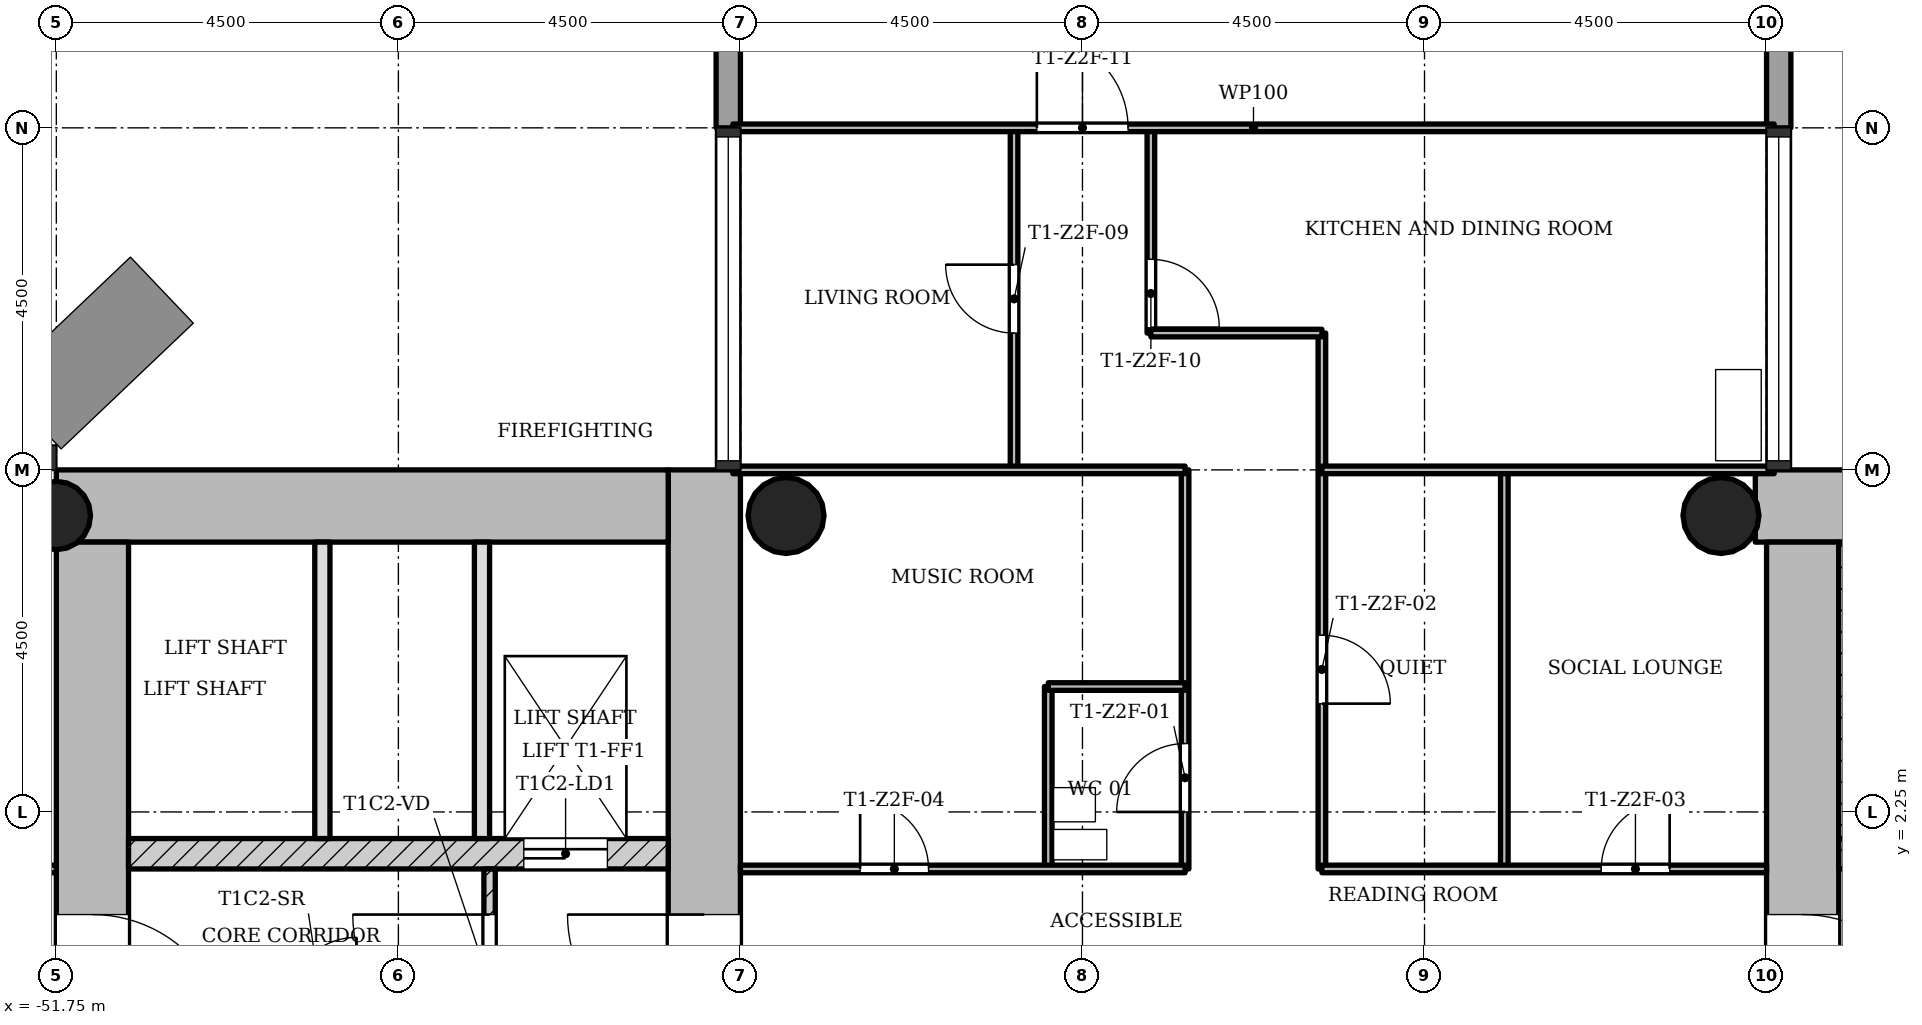
"""IFC4 building model, lengths in metres.
Left out: names, types, materials, properties, quantities, classifications, styles, units other than length and angle.
Written with IfcOpenShell. Run it as: python <this file> out.ifc"""

import sys

from ifc_helpers import new_model, si_unit, direction, frame, frame_2d, origin, origin_2d, place, context, subcontext, project, spatial, rectangle, hollow_circle, extrude, element, fill, save


model = new_model("IFC4")
c1 = context("Model", 3, precision=1e-05, world=origin(), true_north=direction((0.0, 1.0)))
c2 = subcontext(c1, "Body", "Model", "MODEL_VIEW")
j1 = project(units=[si_unit("LENGTHUNIT", "METRE"), si_unit("PLANEANGLEUNIT", "RADIAN")], contexts=[c1])
p1 = place(None, origin())
s1 = spatial("IfcSite", under=j1, at=p1, CompositionType="ELEMENT")
p2 = place(p1, origin())
s2 = spatial("IfcBuilding", under=s1, at=p2, CompositionType="ELEMENT")
p3 = place(p2, frame((0.0, 0.0, 114.0)))
s3 = spatial("IfcBuildingStorey", under=s2, at=p3, CompositionType="ELEMENT", Elevation=114.0)
p4 = place(p3, frame((-20.702, 6.275, 0.0), z_axis=(0.0, 0.0, 1.0), x_axis=(-1.0, 0.0, 0.0)))
e1 = element("IfcWall", 1, at=p4, inside=s3, PredefinedType="SHEAR", context=c2, shape_type="SweptSolid", body=[
    extrude(rectangle(XDim=8.696, YDim=0.95, at=frame_2d((4.348, 0.0))), origin(), (0.0, 0.0, 1.0), 3.4),
])
p5 = place(p3, frame((-28.775, 5.8, 0.0), z_axis=(0.0, 0.0, 1.0), x_axis=(0.0, -1.0, 0.0)))
e2 = element("IfcWall", 2, at=p5, inside=s3, PredefinedType="SHEAR", context=c2, shape_type="SweptSolid", body=[
    extrude(rectangle(XDim=12.55, YDim=0.95, at=frame_2d((6.275, 0.0))), origin(), (0.0, 0.0, 1.0), 3.4),
])
p6 = place(p5, frame((4.9, 0.0, 0.0)))
e3 = element("IfcOpeningElement", 3, at=p6, cuts=e2, PredefinedType="OPENING", context=c2, shape_type="SweptSolid", body=[
    extrude(rectangle(XDim=1.8, YDim=2.1, at=frame_2d((0.9, 1.05))), frame((0.0, 0.485, 0.0), z_axis=(0.0, -1.0, 0.0), x_axis=(1.0, 0.0, 0.0)), (0.0, 0.0, 1.0), 0.97),
])
p7 = place(p3, frame((-28.3, 1.7, 0.0), z_axis=(0.0, 0.0, 1.0), x_axis=(1.0, 0.0, 0.0)))
e4 = element("IfcWall", 4, at=p7, inside=s3, PredefinedType="SHEAR", context=c2, shape_type="SweptSolid", body=[
    extrude(rectangle(XDim=7.1, YDim=0.4, at=frame_2d((3.55, 0.0))), origin(), (0.0, 0.0, 1.0), 3.4),
])
p8 = place(p7, frame((0.7, 0.0, 0.0)))
e5 = element("IfcOpeningElement", 5, at=p8, cuts=e4, PredefinedType="OPENING", context=c2, shape_type="SweptSolid", body=[
    extrude(rectangle(XDim=0.9, YDim=2.1, at=frame_2d((0.45, 1.05))), frame((0.0, 0.21, 0.0), z_axis=(0.0, -1.0, 0.0), x_axis=(1.0, 0.0, 0.0)), (0.0, 0.0, 1.0), 0.42),
])
p9 = place(p3, frame((-43.225, -5.8, 0.0), z_axis=(0.0, 0.0, 1.0), x_axis=(0.0, 1.0, 0.0)))
e6 = element("IfcWall", 6, at=p9, inside=s3, PredefinedType="SHEAR", context=c2, shape_type="SweptSolid", body=[
    extrude(rectangle(XDim=12.55, YDim=0.95, at=frame_2d((6.275, 0.0))), origin(), (0.0, 0.0, 1.0), 3.4),
])
p10 = place(p9, frame((4.9, 0.0, 0.0)))
e7 = element("IfcOpeningElement", 7, at=p10, cuts=e6, PredefinedType="OPENING", context=c2, shape_type="SweptSolid", body=[
    extrude(rectangle(XDim=1.8, YDim=2.1, at=frame_2d((0.9, 1.05))), frame((0.0, 0.485, 0.0), z_axis=(0.0, -1.0, 0.0), x_axis=(1.0, 0.0, 0.0)), (0.0, 0.0, 1.0), 0.97),
])
p11 = place(p3, frame((-43.7, 6.275, 0.0), z_axis=(0.0, 0.0, 1.0), x_axis=(-1.0, 0.0, 0.0)))
e8 = element("IfcWall", 8, at=p11, inside=s3, PredefinedType="SHEAR", context=c2, shape_type="SweptSolid", body=[
    extrude(rectangle(XDim=8.05, YDim=0.95, at=frame_2d((4.025, 0.0))), origin(), (0.0, 0.0, 1.0), 3.4),
])
p12 = place(p3, frame((-51.275, 5.8, 0.0), z_axis=(0.0, 0.0, 1.0), x_axis=(0.0, -1.0, 0.0)))
e9 = element("IfcWall", 9, at=p12, inside=s3, PredefinedType="SHEAR", context=c2, shape_type="SweptSolid", body=[
    extrude(rectangle(XDim=12.55, YDim=0.95, at=frame_2d((6.275, 0.0))), origin(), (0.0, 0.0, 1.0), 3.4),
])
p13 = place(p12, frame((4.9, 0.0, 0.0)))
e10 = element("IfcOpeningElement", 10, at=p13, cuts=e9, PredefinedType="OPENING", context=c2, shape_type="SweptSolid", body=[
    extrude(rectangle(XDim=1.8, YDim=2.1, at=frame_2d((0.9, 1.05))), frame((0.0, 0.485, 0.0), z_axis=(0.0, -1.0, 0.0), x_axis=(1.0, 0.0, 0.0)), (0.0, 0.0, 1.0), 0.97),
])
p14 = place(p3, frame((-50.8, 1.7, 0.0), z_axis=(0.0, 0.0, 1.0), x_axis=(1.0, 0.0, 0.0)))
e11 = element("IfcWall", 11, at=p14, inside=s3, PredefinedType="SHEAR", context=c2, shape_type="SweptSolid", body=[
    extrude(rectangle(XDim=7.1, YDim=0.4, at=frame_2d((3.55, 0.0))), origin(), (0.0, 0.0, 1.0), 3.4),
])
p15 = place(p14, frame((5.2, 0.0, 0.0)))
e12 = element("IfcOpeningElement", 12, at=p15, cuts=e11, PredefinedType="OPENING", context=c2, shape_type="SweptSolid", body=[
    extrude(rectangle(XDim=1.1, YDim=2.1, at=frame_2d((0.55, 1.05))), frame((0.0, 0.21, 0.0), z_axis=(0.0, -1.0, 0.0), x_axis=(1.0, 0.0, 0.0)), (0.0, 0.0, 1.0), 0.42),
])
p16 = place(p3, frame((-51.75, 6.15, 0.0), z_axis=(0.0, 0.0, 1.0), x_axis=(1.0, 0.0, 0.0)))
e13 = element("IfcColumn", 13, at=p16, inside=s3, PredefinedType="COLUMN", context=c2, shape_type="SweptSolid", body=[
    extrude(hollow_circle(Radius=0.45, WallThickness=0.032, at=origin_2d()), origin(), (0.0, 0.0, 1.0), 3.4),
])
for number, where, z_axis, x_axis in (
    (14, (-29.85, 6.15, 0.0), (0.0, 0.0, 1.0), (1.0, 0.0, 0.0)),
    (15, (-42.15, 6.15, 0.0), (0.0, 0.0, 1.0), (1.0, 0.0, 0.0)),
):
    element("IfcColumn", number, at=place(p3, frame(where, z_axis=z_axis, x_axis=x_axis)), inside=s3, PredefinedType="COLUMN", context=c2, shape_type="SweptSolid", body=[
        extrude(hollow_circle(Radius=0.5, WallThickness=0.036, at=origin_2d()), origin(), (0.0, 0.0, 1.0), 3.4),
    ])
p17 = place(p3, frame((-29.09, 11.25, -0.3), z_axis=(0.0, 0.0, 1.0), x_axis=(0.0, 1.0, 0.0)))
e16 = element("IfcWall", 16, at=p17, inside=s3, PredefinedType="STANDARD", context=c2, shape_type="SweptSolid", body=[
    extrude(rectangle(XDim=1.82, YDim=0.32, at=frame_2d((0.91, 0.0))), origin(), (0.0, 0.0, 1.0), 3.4),
])
p18 = place(p3, frame((-42.91, 12.75, -0.3), z_axis=(0.0, 0.0, 1.0), x_axis=(0.0, -1.0, 0.0)))
e17 = element("IfcWall", 17, at=p18, inside=s3, PredefinedType="STANDARD", context=c2, shape_type="SweptSolid", body=[
    extrude(rectangle(XDim=1.5, YDim=0.32, at=frame_2d((0.75, 0.0))), origin(), (0.0, 0.0, 1.0), 3.4),
])
p19 = place(p3, frame((-46.05, 1.5, 0.0), z_axis=(0.0, 0.0, 1.0), x_axis=(0.0, -1.0, 0.0)))
e18 = element("IfcWall", 18, at=p19, inside=s3, PredefinedType="PARTITIONING", context=c2, shape_type="SweptSolid", body=[
    extrude(rectangle(XDim=3.0, YDim=0.15, at=frame_2d((1.5, 0.0))), origin(), (0.0, 0.0, 1.0), 3.0),
])
p20 = place(p19, frame((0.6, 0.0, 0.0)))
e19 = element("IfcOpeningElement", 19, at=p20, cuts=e18, PredefinedType="OPENING", context=c2, shape_type="SweptSolid", body=[
    extrude(rectangle(XDim=1.8, YDim=2.1, at=frame_2d((0.9, 1.05))), frame((0.0, 0.085, 0.0), z_axis=(0.0, -1.0, 0.0), x_axis=(1.0, 0.0, 0.0)), (0.0, 0.0, 1.0), 0.17),
])
for number, where, z_axis, x_axis in (
    (20, (-46.15, 5.8, 0.0), (0.0, 0.0, 1.0), (0.0, -1.0, 0.0)),
    (21, (-48.25, 5.8, 0.0), (0.0, 0.0, 1.0), (0.0, -1.0, 0.0)),
):
    element("IfcWall", number, at=place(p3, frame(where, z_axis=z_axis, x_axis=x_axis)), inside=s3, PredefinedType="SOLIDWALL", context=c2, shape_type="SweptSolid", body=[
        extrude(rectangle(XDim=3.9, YDim=0.2, at=frame_2d((1.95, 0.0))), origin(), (0.0, 0.0, 1.0), 3.0),
    ])
p21 = place(p3, frame((-39.15, 6.75, 0.0), z_axis=(0.0, 0.0, 1.0), x_axis=(0.0, 1.0, 0.0)))
e22 = element("IfcWall", 22, at=p21, inside=s3, PredefinedType="PARTITIONING", context=c2, shape_type="SweptSolid", body=[
    extrude(rectangle(XDim=4.5, YDim=0.1, at=frame_2d((2.25, 0.0))), origin(), (0.0, 0.0, 1.0), 3.0),
])
p22 = place(p21, frame((1.8, 0.0, 0.0)))
e23 = element("IfcOpeningElement", 23, at=p22, cuts=e22, PredefinedType="OPENING", context=c2, shape_type="SweptSolid", body=[
    extrude(rectangle(XDim=0.9, YDim=2.1, at=frame_2d((0.45, 1.05))), frame((0.0, 0.06, 0.0), z_axis=(0.0, -1.0, 0.0), x_axis=(1.0, 0.0, 0.0)), (0.0, 0.0, 1.0), 0.12),
])
p23 = place(p3, frame((-38.7, 1.5, 0.0), z_axis=(0.0, 0.0, 1.0), x_axis=(0.0, 1.0, 0.0)))
e24 = element("IfcWall", 24, at=p23, inside=s3, PredefinedType="PARTITIONING", context=c2, shape_type="SweptSolid", body=[
    extrude(rectangle(XDim=2.4, YDim=0.1, at=frame_2d((1.2, 0.0))), origin(), (0.0, 0.0, 1.0), 3.0),
])
p24 = place(p3, frame((-37.35, 8.55, 0.0), z_axis=(0.0, 0.0, 1.0), x_axis=(0.0, 1.0, 0.0)))
e25 = element("IfcWall", 25, at=p24, inside=s3, PredefinedType="PARTITIONING", context=c2, shape_type="SweptSolid", body=[
    extrude(rectangle(XDim=2.7, YDim=0.1, at=frame_2d((1.35, 0.0))), origin(), (0.0, 0.0, 1.0), 3.0),
])
p25 = place(p24, frame((0.07, 0.0, 0.0)))
e26 = element("IfcOpeningElement", 26, at=p25, cuts=e25, PredefinedType="OPENING", context=c2, shape_type="SweptSolid", body=[
    extrude(rectangle(XDim=0.9, YDim=2.1, at=frame_2d((0.45, 1.05))), frame((0.0, 0.06, 0.0), z_axis=(0.0, -1.0, 0.0), x_axis=(1.0, 0.0, 0.0)), (0.0, 0.0, 1.0), 0.12),
])
p26 = place(p3, frame((-36.9, 1.5, 0.0), z_axis=(0.0, 0.0, 1.0), x_axis=(0.0, 1.0, 0.0)))
e27 = element("IfcWall", 27, at=p26, inside=s3, PredefinedType="PARTITIONING", context=c2, shape_type="SweptSolid", body=[
    extrude(rectangle(XDim=5.25, YDim=0.1, at=frame_2d((2.625, 0.0))), origin(), (0.0, 0.0, 1.0), 3.0),
])
p27 = place(p26, frame((0.75, 0.0, 0.0)))
e28 = element("IfcOpeningElement", 28, at=p27, cuts=e27, PredefinedType="OPENING", context=c2, shape_type="SweptSolid", body=[
    extrude(rectangle(XDim=0.9, YDim=2.1, at=frame_2d((0.45, 1.05))), frame((0.0, 0.06, 0.0), z_axis=(0.0, -1.0, 0.0), x_axis=(1.0, 0.0, 0.0)), (0.0, 0.0, 1.0), 0.12),
])
p28 = place(p3, frame((-35.1, 1.5, 0.0), z_axis=(0.0, 0.0, 1.0), x_axis=(0.0, 1.0, 0.0)))
e29 = element("IfcWall", 29, at=p28, inside=s3, PredefinedType="PARTITIONING", context=c2, shape_type="SweptSolid", body=[
    extrude(rectangle(XDim=7.05, YDim=0.1, at=frame_2d((3.525, 0.0))), origin(), (0.0, 0.0, 1.0), 3.0),
])
p29 = place(p28, frame((2.175, 0.0, 0.0)))
e30 = element("IfcOpeningElement", 30, at=p29, cuts=e29, PredefinedType="OPENING", context=c2, shape_type="SweptSolid", body=[
    extrude(rectangle(XDim=0.9, YDim=2.1, at=frame_2d((0.45, 1.05))), frame((0.0, 0.06, 0.0), z_axis=(0.0, -1.0, 0.0), x_axis=(1.0, 0.0, 0.0)), (0.0, 0.0, 1.0), 0.12),
])
p30 = place(p3, frame((-32.7, 1.5, 0.0), z_axis=(0.0, 0.0, 1.0), x_axis=(0.0, 1.0, 0.0)))
e31 = element("IfcWall", 31, at=p30, inside=s3, PredefinedType="PARTITIONING", context=c2, shape_type="SweptSolid", body=[
    extrude(rectangle(XDim=5.25, YDim=0.1, at=frame_2d((2.625, 0.0))), origin(), (0.0, 0.0, 1.0), 3.0),
])
p31 = place(p3, frame((-56.25, 1.5, 0.0), z_axis=(0.0, 0.0, 1.0), x_axis=(1.0, 0.0, 0.0)))
e32 = element("IfcWall", 32, at=p31, inside=s3, PredefinedType="PARTITIONING", context=c2, shape_type="SweptSolid", body=[
    extrude(rectangle(XDim=4.5, YDim=0.1, at=frame_2d((2.25, 0.0))), origin(), (0.0, 0.0, 1.0), 3.0),
])
p32 = place(p31, frame((1.8, 0.0, 0.0)))
e33 = element("IfcOpeningElement", 33, at=p32, cuts=e32, PredefinedType="OPENING", context=c2, shape_type="SweptSolid", body=[
    extrude(rectangle(XDim=0.9, YDim=2.1, at=frame_2d((0.45, 1.05))), frame((0.0, 0.06, 0.0), z_axis=(0.0, -1.0, 0.0), x_axis=(1.0, 0.0, 0.0)), (0.0, 0.0, 1.0), 0.12),
])
p33 = place(p3, frame((-42.75, 1.5, 0.0), z_axis=(0.0, 0.0, 1.0), x_axis=(1.0, 0.0, 0.0)))
e34 = element("IfcWall", 34, at=p33, inside=s3, PredefinedType="PARTITIONING", context=c2, shape_type="SweptSolid", body=[
    extrude(rectangle(XDim=5.85, YDim=0.1, at=frame_2d((2.925, 0.0))), origin(), (0.0, 0.0, 1.0), 3.0),
])
p34 = place(p33, frame((1.575, 0.0, 0.0)))
e35 = element("IfcOpeningElement", 35, at=p34, cuts=e34, PredefinedType="OPENING", context=c2, shape_type="SweptSolid", body=[
    extrude(rectangle(XDim=0.9, YDim=2.1, at=frame_2d((0.45, 1.05))), frame((0.0, 0.06, 0.0), z_axis=(0.0, -1.0, 0.0), x_axis=(1.0, 0.0, 0.0)), (0.0, 0.0, 1.0), 0.12),
])
p35 = place(p3, frame((-35.1, 1.5, 0.0), z_axis=(0.0, 0.0, 1.0), x_axis=(1.0, 0.0, 0.0)))
e36 = element("IfcWall", 36, at=p35, inside=s3, PredefinedType="PARTITIONING", context=c2, shape_type="SweptSolid", body=[
    extrude(rectangle(XDim=5.85, YDim=0.1, at=frame_2d((2.925, 0.0))), origin(), (0.0, 0.0, 1.0), 3.0),
])
p36 = place(p35, frame((3.675, 0.0, 0.0)))
e37 = element("IfcOpeningElement", 37, at=p36, cuts=e36, PredefinedType="OPENING", context=c2, shape_type="SweptSolid", body=[
    extrude(rectangle(XDim=0.9, YDim=2.1, at=frame_2d((0.45, 1.05))), frame((0.0, 0.06, 0.0), z_axis=(0.0, -1.0, 0.0), x_axis=(1.0, 0.0, 0.0)), (0.0, 0.0, 1.0), 0.12),
])
p37 = place(p3, frame((-38.7, 3.9, 0.0), z_axis=(0.0, 0.0, 1.0), x_axis=(1.0, 0.0, 0.0)))
e38 = element("IfcWall", 38, at=p37, inside=s3, PredefinedType="PARTITIONING", context=c2, shape_type="SweptSolid", body=[
    extrude(rectangle(XDim=1.8, YDim=0.1, at=frame_2d((0.9, 0.0))), origin(), (0.0, 0.0, 1.0), 3.0),
])
for number, where, z_axis, x_axis in (
    (39, (-42.85, 6.75, 0.0), (0.0, 0.0, 1.0), (1.0, 0.0, 0.0)),
    (40, (-35.1, 6.75, 0.0), (0.0, 0.0, 1.0), (1.0, 0.0, 0.0)),
):
    element("IfcWall", number, at=place(p3, frame(where, z_axis=z_axis, x_axis=x_axis)), inside=s3, PredefinedType="PARTITIONING", context=c2, shape_type="SweptSolid", body=[
        extrude(rectangle(XDim=5.95, YDim=0.1, at=frame_2d((2.975, 0.0))), origin(), (0.0, 0.0, 1.0), 3.0),
    ])
p38 = place(p3, frame((-37.35, 8.55, 0.0), z_axis=(0.0, 0.0, 1.0), x_axis=(1.0, 0.0, 0.0)))
e41 = element("IfcWall", 41, at=p38, inside=s3, PredefinedType="PARTITIONING", context=c2, shape_type="SweptSolid", body=[
    extrude(rectangle(XDim=2.25, YDim=0.1, at=frame_2d((1.125, 0.0))), origin(), (0.0, 0.0, 1.0), 3.0),
])
p39 = place(p3, frame((-42.85, 11.25, 0.0), z_axis=(0.0, 0.0, 1.0), x_axis=(1.0, 0.0, 0.0)))
e42 = element("IfcWall", 42, at=p39, inside=s3, PredefinedType="PARTITIONING", context=c2, shape_type="SweptSolid", body=[
    extrude(rectangle(XDim=13.7, YDim=0.1, at=frame_2d((6.85, 0.0))), origin(), (0.0, 0.0, 1.0), 3.0),
])
p40 = place(p39, frame((4.0, 0.0, 0.0)))
e43 = element("IfcOpeningElement", 43, at=p40, cuts=e42, PredefinedType="OPENING", context=c2, shape_type="SweptSolid", body=[
    extrude(rectangle(XDim=1.2, YDim=2.1, at=frame_2d((0.6, 1.05))), frame((0.0, 0.06, 0.0), z_axis=(0.0, -1.0, 0.0), x_axis=(1.0, 0.0, 0.0)), (0.0, 0.0, 1.0), 0.12),
])
p41 = place(p3, frame((-28.175, 1.9, 0.0), z_axis=(0.0, 0.0, 1.0), x_axis=(0.0, 1.0, 0.0)))
e44 = element("IfcWall", 44, at=p41, inside=s3, PredefinedType="SHEAR", context=c2, shape_type="SweptSolid", body=[
    extrude(rectangle(XDim=3.9, YDim=0.25, at=frame_2d((1.95, 0.0))), origin(), (0.0, 0.0, 1.0), 3.4),
])
p42 = place(p20, origin())
e45 = element("IfcDoor", 45, at=p42, inside=s3, OperationType="SINGLE_SWING_LEFT", PredefinedType="DOOR", context=c2, shape_type="SweptSolid", body=[
    extrude(rectangle(XDim=1.8, YDim=2.1, at=frame_2d((0.9, 1.05))), frame((0.0, 0.025, 0.0), z_axis=(0.0, -1.0, 0.0), x_axis=(1.0, 0.0, 0.0)), (0.0, 0.0, 1.0), 0.05),
])
fill(e19, e45)
p43 = place(p27, origin())
e46 = element("IfcDoor", 46, at=p43, inside=s3, OperationType="SINGLE_SWING_RIGHT", PredefinedType="DOOR", context=c2, shape_type="SweptSolid", body=[
    extrude(rectangle(XDim=0.9, YDim=2.1, at=frame_2d((0.45, 1.05))), frame((0.0, 0.025, 0.0), z_axis=(0.0, -1.0, 0.0), x_axis=(1.0, 0.0, 0.0)), (0.0, 0.0, 1.0), 0.05),
])
fill(e28, e46)
p44 = place(p29, origin())
e47 = element("IfcDoor", 47, at=p44, inside=s3, OperationType="SINGLE_SWING_LEFT", PredefinedType="DOOR", context=c2, shape_type="SweptSolid", body=[
    extrude(rectangle(XDim=0.9, YDim=2.1, at=frame_2d((0.45, 1.05))), frame((0.0, 0.025, 0.0), z_axis=(0.0, -1.0, 0.0), x_axis=(1.0, 0.0, 0.0)), (0.0, 0.0, 1.0), 0.05),
])
fill(e30, e47)
p45 = place(p36, origin())
e48 = element("IfcDoor", 48, at=p45, inside=s3, OperationType="SINGLE_SWING_LEFT", PredefinedType="DOOR", context=c2, shape_type="SweptSolid", body=[
    extrude(rectangle(XDim=0.9, YDim=2.1, at=frame_2d((0.45, 1.05))), frame((0.0, 0.025, 0.0), z_axis=(0.0, -1.0, 0.0), x_axis=(1.0, 0.0, 0.0)), (0.0, 0.0, 1.0), 0.05),
])
fill(e37, e48)
p46 = place(p34, origin())
e49 = element("IfcDoor", 49, at=p46, inside=s3, OperationType="SINGLE_SWING_RIGHT", PredefinedType="DOOR", context=c2, shape_type="SweptSolid", body=[
    extrude(rectangle(XDim=0.9, YDim=2.1, at=frame_2d((0.45, 1.05))), frame((0.0, 0.025, 0.0), z_axis=(0.0, -1.0, 0.0), x_axis=(1.0, 0.0, 0.0)), (0.0, 0.0, 1.0), 0.05),
])
fill(e35, e49)
p47 = place(p22, origin())
e50 = element("IfcDoor", 50, at=p47, inside=s3, OperationType="SINGLE_SWING_LEFT", PredefinedType="DOOR", context=c2, shape_type="SweptSolid", body=[
    extrude(rectangle(XDim=0.9, YDim=2.1, at=frame_2d((0.45, 1.05))), frame((0.0, 0.025, 0.0), z_axis=(0.0, -1.0, 0.0), x_axis=(1.0, 0.0, 0.0)), (0.0, 0.0, 1.0), 0.05),
])
fill(e23, e50)
p48 = place(p25, origin())
e51 = element("IfcDoor", 51, at=p48, inside=s3, OperationType="SINGLE_SWING_LEFT", PredefinedType="DOOR", context=c2, shape_type="SweptSolid", body=[
    extrude(rectangle(XDim=0.9, YDim=2.1, at=frame_2d((0.45, 1.05))), frame((0.0, 0.025, 0.0), z_axis=(0.0, -1.0, 0.0), x_axis=(1.0, 0.0, 0.0)), (0.0, 0.0, 1.0), 0.05),
])
fill(e26, e51)
p49 = place(p40, origin())
e52 = element("IfcDoor", 52, at=p49, inside=s3, OperationType="SINGLE_SWING_RIGHT", PredefinedType="DOOR", context=c2, shape_type="SweptSolid", body=[
    extrude(rectangle(XDim=1.2, YDim=2.1, at=frame_2d((0.6, 1.05))), frame((0.0, 0.025, 0.0), z_axis=(0.0, -1.0, 0.0), x_axis=(1.0, 0.0, 0.0)), (0.0, 0.0, 1.0), 0.05),
])
fill(e43, e52)
p50 = place(p6, origin())
e53 = element("IfcDoor", 53, at=p50, inside=s3, OperationType="SINGLE_SWING_LEFT", PredefinedType="DOOR", context=c2, shape_type="SweptSolid", body=[
    extrude(rectangle(XDim=1.8, YDim=2.1, at=frame_2d((0.9, 1.05))), frame((0.0, 0.025, 0.0), z_axis=(0.0, -1.0, 0.0), x_axis=(1.0, 0.0, 0.0)), (0.0, 0.0, 1.0), 0.05),
])
fill(e3, e53)
p51 = place(p15, origin())
e54 = element("IfcDoor", 54, at=p51, inside=s3, OperationType="SLIDING_TO_LEFT", PredefinedType="DOOR", context=c2, shape_type="SweptSolid", body=[
    extrude(rectangle(XDim=1.1, YDim=2.1, at=frame_2d((0.55, 1.05))), frame((0.0, 0.025, 0.0), z_axis=(0.0, -1.0, 0.0), x_axis=(1.0, 0.0, 0.0)), (0.0, 0.0, 1.0), 0.05),
])
fill(e12, e54)
p52 = place(p10, origin())
e55 = element("IfcDoor", 55, at=p52, inside=s3, OperationType="SINGLE_SWING_LEFT", PredefinedType="DOOR", context=c2, shape_type="SweptSolid", body=[
    extrude(rectangle(XDim=1.8, YDim=2.1, at=frame_2d((0.9, 1.05))), frame((0.0, 0.025, 0.0), z_axis=(0.0, -1.0, 0.0), x_axis=(1.0, 0.0, 0.0)), (0.0, 0.0, 1.0), 0.05),
])
fill(e7, e55)
p53 = place(p13, origin())
e56 = element("IfcDoor", 56, at=p53, inside=s3, OperationType="SINGLE_SWING_LEFT", PredefinedType="DOOR", context=c2, shape_type="SweptSolid", body=[
    extrude(rectangle(XDim=1.8, YDim=2.1, at=frame_2d((0.9, 1.05))), frame((0.0, 0.025, 0.0), z_axis=(0.0, -1.0, 0.0), x_axis=(1.0, 0.0, 0.0)), (0.0, 0.0, 1.0), 0.05),
])
fill(e10, e56)
save(model, sys.argv[1])
